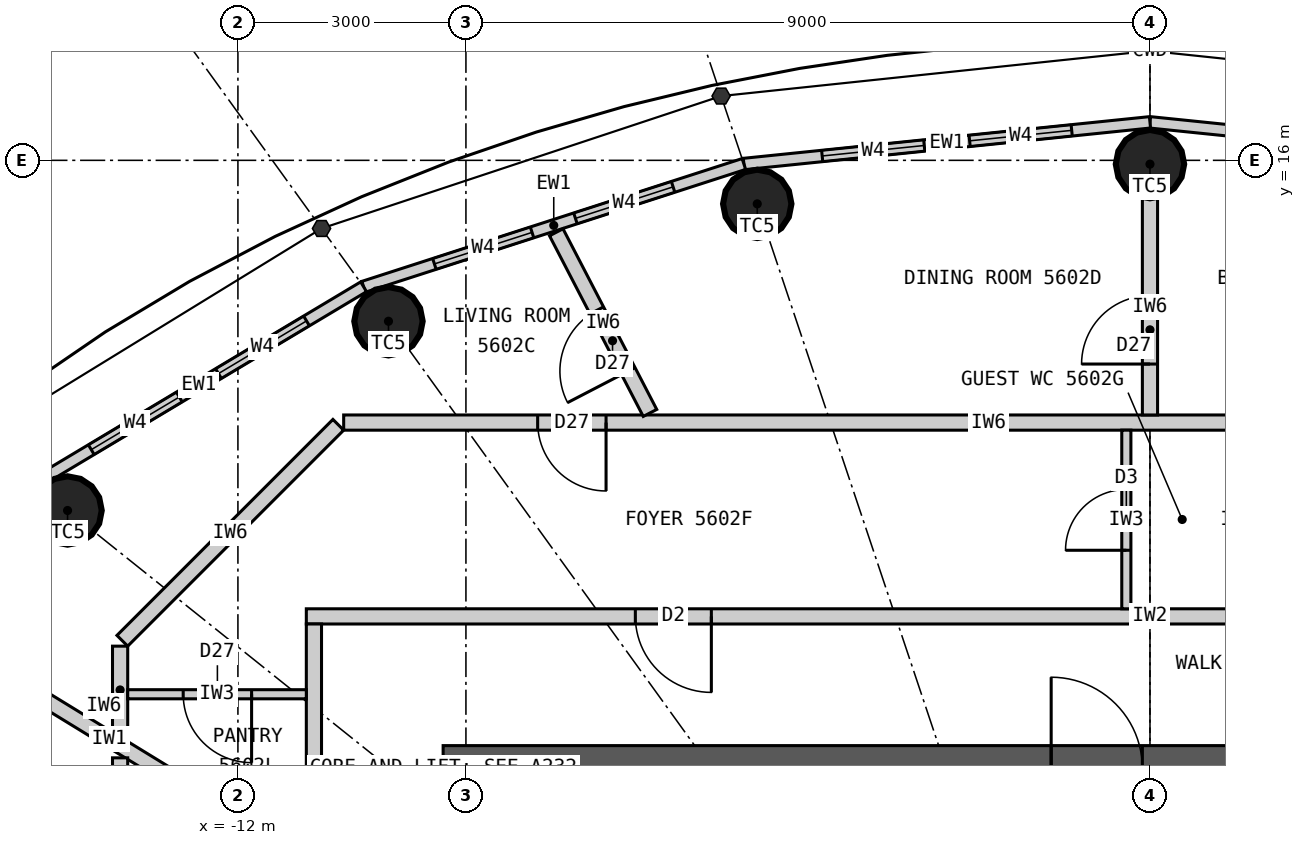
"""IFC4 building model, lengths in metres.
Left out: names, types, materials, properties, quantities, classifications, styles, units other than length and angle.
Written with IfcOpenShell. Run it as: python <this file> out.ifc"""

import sys

from ifc_helpers import new_model, si_unit, direction, frame, frame_2d, origin, origin_2d, place, context, subcontext, project, spatial, rectangle, circle, extrude, element, fill, save


model = new_model("IFC4")
c1 = context("Model", 3, precision=1e-05, world=origin(), true_north=direction((0.0, 1.0)))
c2 = subcontext(c1, "Body", "Model", "MODEL_VIEW")
j1 = project(units=[si_unit("LENGTHUNIT", "METRE"), si_unit("PLANEANGLEUNIT", "RADIAN")], contexts=[c1])
p1 = place(None, origin())
s1 = spatial("IfcSite", under=j1, at=p1, CompositionType="ELEMENT")
p2 = place(p1, origin())
s2 = spatial("IfcBuilding", under=s1, at=p2, CompositionType="ELEMENT")
p3 = place(p2, frame((0.0, 0.0, 209.4)))
s3 = spatial("IfcBuildingStorey", under=s2, at=p3, CompositionType="ELEMENT", Elevation=209.4)
for number, where, z_axis, x_axis in (
    (1, (0.0, 15.95, 0.0), (0.0, 0.0, 1.0), (1.0, 0.0, 0.0)),
    (2, (-5.167, 15.427, 0.0), (0.0, 0.0, 1.0), (1.0, 0.0, 0.0)),
    (3, (-10.019, 13.883, 0.0), (0.0, 0.0, 1.0), (1.0, 0.0, 0.0)),
    (4, (-14.241, 11.393, 0.0), (0.0, 0.0, 1.0), (1.0, 0.0, 0.0)),
):
    element("IfcColumn", number, at=place(p3, frame(where, z_axis=z_axis, x_axis=x_axis)), inside=s3, PredefinedType="COLUMN", context=c2, shape_type="SweptSolid", body=[
        extrude(circle(Radius=0.45, at=origin_2d()), origin(), (0.0, 0.0, 1.0), 3.3),
    ])
p4 = place(p3, frame((-9.3, 8.0, 0.0), z_axis=(0.0, 0.0, 1.0), x_axis=(1.0, 0.0, 0.0)))
e5 = element("IfcWall", 5, at=p4, inside=s3, PredefinedType="SHEAR", context=c2, shape_type="SweptSolid", body=[
    extrude(rectangle(XDim=18.6, YDim=0.6, at=frame_2d((9.3, 0.0))), origin(), (0.0, 0.0, 1.0), 3.3),
])
p5 = place(p4, frame((8.0, 0.0, 0.0)))
e6 = element("IfcOpeningElement", 6, at=p5, cuts=e5, PredefinedType="OPENING", context=c2, shape_type="SweptSolid", body=[
    extrude(rectangle(XDim=1.2, YDim=2.2, at=frame_2d((0.6, 1.1))), frame((0.0, 0.31, 0.0), z_axis=(0.0, -1.0, 0.0), x_axis=(1.0, 0.0, 0.0)), (0.0, 0.0, 1.0), 0.62),
])
p6 = place(p4, frame((15.6, 0.0, 0.0)))
e7 = element("IfcOpeningElement", 7, at=p6, cuts=e5, PredefinedType="OPENING", context=c2, shape_type="SweptSolid", body=[
    extrude(rectangle(XDim=0.9, YDim=2.2, at=frame_2d((0.45, 1.1))), frame((0.0, 0.31, 0.0), z_axis=(0.0, -1.0, 0.0), x_axis=(1.0, 0.0, 0.0)), (0.0, 0.0, 1.0), 0.62),
])
p7 = place(p3, frame((5.343, 15.952, 0.0), z_axis=(0.0, 0.0, 1.0), x_axis=(-0.994774574972, 0.102095763818, 0.0)))
e8 = element("IfcWall", 8, at=p7, inside=s3, PredefinedType="ELEMENTEDWALL", context=c2, shape_type="SweptSolid", body=[
    extrude(rectangle(XDim=5.371, YDim=0.15, at=frame_2d((2.686, 0.0))), origin(), (0.0, 0.0, 1.0), 3.12),
])
p8 = place(p7, frame((1.035, 0.0, 0.9)))
e9 = element("IfcOpeningElement", 9, at=p8, cuts=e8, PredefinedType="OPENING", context=c2, shape_type="SweptSolid", body=[
    extrude(rectangle(XDim=1.35, YDim=1.9, at=frame_2d((0.675, 0.95))), frame((0.0, 0.085, 0.0), z_axis=(0.0, -1.0, 0.0), x_axis=(1.0, 0.0, 0.0)), (0.0, 0.0, 1.0), 0.17),
])
p9 = place(p7, frame((2.985, 0.0, 0.9)))
e10 = element("IfcOpeningElement", 10, at=p9, cuts=e8, PredefinedType="OPENING", context=c2, shape_type="SweptSolid", body=[
    extrude(rectangle(XDim=1.35, YDim=1.9, at=frame_2d((0.675, 0.95))), frame((0.0, 0.085, 0.0), z_axis=(0.0, -1.0, 0.0), x_axis=(1.0, 0.0, 0.0)), (0.0, 0.0, 1.0), 0.17),
])
p10 = place(p3, frame((0.0, 16.5, 0.0), z_axis=(0.0, 0.0, 1.0), x_axis=(-0.994774574972, -0.102095763818, 0.0)))
e11 = element("IfcWall", 11, at=p10, inside=s3, PredefinedType="ELEMENTEDWALL", context=c2, shape_type="SweptSolid", body=[
    extrude(rectangle(XDim=5.371, YDim=0.15, at=frame_2d((2.686, 0.0))), origin(), (0.0, 0.0, 1.0), 3.12),
])
p11 = place(p10, frame((1.035, 0.0, 0.9)))
e12 = element("IfcOpeningElement", 12, at=p11, cuts=e11, PredefinedType="OPENING", context=c2, shape_type="SweptSolid", body=[
    extrude(rectangle(XDim=1.35, YDim=1.9, at=frame_2d((0.675, 0.95))), frame((0.0, 0.085, 0.0), z_axis=(0.0, -1.0, 0.0), x_axis=(1.0, 0.0, 0.0)), (0.0, 0.0, 1.0), 0.17),
])
p12 = place(p10, frame((2.985, 0.0, 0.9)))
e13 = element("IfcOpeningElement", 13, at=p12, cuts=e11, PredefinedType="OPENING", context=c2, shape_type="SweptSolid", body=[
    extrude(rectangle(XDim=1.35, YDim=1.9, at=frame_2d((0.675, 0.95))), frame((0.0, 0.085, 0.0), z_axis=(0.0, -1.0, 0.0), x_axis=(1.0, 0.0, 0.0)), (0.0, 0.0, 1.0), 0.17),
])
p13 = place(p3, frame((-5.343, 15.952, 0.0), z_axis=(0.0, 0.0, 1.0), x_axis=(-0.951644702515, -0.307200846638, 0.0)))
e14 = element("IfcWall", 14, at=p13, inside=s3, PredefinedType="ELEMENTEDWALL", context=c2, shape_type="SweptSolid", body=[
    extrude(rectangle(XDim=5.258, YDim=0.15, at=frame_2d((2.629, 0.0))), origin(), (0.0, 0.0, 1.0), 3.12),
])
p14 = place(p13, frame((0.979, 0.0, 0.9)))
e15 = element("IfcOpeningElement", 15, at=p14, cuts=e14, PredefinedType="OPENING", context=c2, shape_type="SweptSolid", body=[
    extrude(rectangle(XDim=1.35, YDim=1.9, at=frame_2d((0.675, 0.95))), frame((0.0, 0.085, 0.0), z_axis=(0.0, -1.0, 0.0), x_axis=(1.0, 0.0, 0.0)), (0.0, 0.0, 1.0), 0.17),
])
p15 = place(p13, frame((2.929, 0.0, 0.9)))
e16 = element("IfcOpeningElement", 16, at=p15, cuts=e14, PredefinedType="OPENING", context=c2, shape_type="SweptSolid", body=[
    extrude(rectangle(XDim=1.35, YDim=1.9, at=frame_2d((0.675, 0.95))), frame((0.0, 0.085, 0.0), z_axis=(0.0, -1.0, 0.0), x_axis=(1.0, 0.0, 0.0)), (0.0, 0.0, 1.0), 0.17),
])
p16 = place(p3, frame((-10.346, 14.336, 0.0), z_axis=(0.0, 0.0, 1.0), x_axis=(-0.85822150553, -0.513279502265, 0.0)))
e17 = element("IfcWall", 17, at=p16, inside=s3, PredefinedType="ELEMENTEDWALL", context=c2, shape_type="SweptSolid", body=[
    extrude(rectangle(XDim=5.05, YDim=0.15, at=frame_2d((2.525, 0.0))), origin(), (0.0, 0.0, 1.0), 3.12),
])
p17 = place(p16, frame((0.875, 0.0, 0.9)))
e18 = element("IfcOpeningElement", 18, at=p17, cuts=e17, PredefinedType="OPENING", context=c2, shape_type="SweptSolid", body=[
    extrude(rectangle(XDim=1.35, YDim=1.9, at=frame_2d((0.675, 0.95))), frame((0.0, 0.085, 0.0), z_axis=(0.0, -1.0, 0.0), x_axis=(1.0, 0.0, 0.0)), (0.0, 0.0, 1.0), 0.17),
])
p18 = place(p16, frame((2.825, 0.0, 0.9)))
e19 = element("IfcOpeningElement", 19, at=p18, cuts=e17, PredefinedType="OPENING", context=c2, shape_type="SweptSolid", body=[
    extrude(rectangle(XDim=1.35, YDim=1.9, at=frame_2d((0.675, 0.95))), frame((0.0, 0.085, 0.0), z_axis=(0.0, -1.0, 0.0), x_axis=(1.0, 0.0, 0.0)), (0.0, 0.0, 1.0), 0.17),
])
p19 = place(p3, frame((-11.1, 10.0, 0.0), z_axis=(0.0, 0.0, 1.0), x_axis=(1.0, 0.0, 0.0)))
e20 = element("IfcWall", 20, at=p19, inside=s3, PredefinedType="PARTITIONING", context=c2, shape_type="SweptSolid", body=[
    extrude(rectangle(XDim=22.2, YDim=0.2, at=frame_2d((11.1, 0.0))), origin(), (0.0, 0.0, 1.0), 3.12),
])
p20 = place(p19, frame((20.9, 0.0, 0.0)))
e21 = element("IfcOpeningElement", 21, at=p20, cuts=e20, PredefinedType="OPENING", context=c2, shape_type="SweptSolid", body=[
    extrude(rectangle(XDim=1.0, YDim=2.2, at=frame_2d((0.5, 1.1))), frame((0.0, 0.11, 0.0), z_axis=(0.0, -1.0, 0.0), x_axis=(1.0, 0.0, 0.0)), (0.0, 0.0, 1.0), 0.22),
])
p21 = place(p19, frame((4.329, 0.0, 0.0)))
e22 = element("IfcOpeningElement", 22, at=p21, cuts=e20, PredefinedType="OPENING", context=c2, shape_type="SweptSolid", body=[
    extrude(rectangle(XDim=1.0, YDim=2.2, at=frame_2d((0.5, 1.1))), frame((0.0, 0.11, 0.0), z_axis=(0.0, -1.0, 0.0), x_axis=(1.0, 0.0, 0.0)), (0.0, 0.0, 1.0), 0.22),
])
p22 = place(p3, frame((-11.0, 9.9, 0.0), z_axis=(0.0, 0.0, 1.0), x_axis=(0.0, -1.0, 0.0)))
e23 = element("IfcWall", 23, at=p22, inside=s3, PredefinedType="PARTITIONING", context=c2, shape_type="SweptSolid", body=[
    extrude(rectangle(XDim=19.8, YDim=0.2, at=frame_2d((9.9, 0.0))), origin(), (0.0, 0.0, 1.0), 3.12),
])
p23 = place(p22, frame((5.075, 0.0, 0.0)))
e24 = element("IfcOpeningElement", 24, at=p23, cuts=e23, PredefinedType="OPENING", context=c2, shape_type="SweptSolid", body=[
    extrude(rectangle(XDim=1.0, YDim=2.2, at=frame_2d((0.5, 1.1))), frame((0.0, 0.11, 0.0), z_axis=(0.0, -1.0, 0.0), x_axis=(1.0, 0.0, 0.0)), (0.0, 0.0, 1.0), 0.22),
])
p24 = place(p22, frame((18.645, 0.0, 0.0)))
e25 = element("IfcOpeningElement", 25, at=p24, cuts=e23, PredefinedType="OPENING", context=c2, shape_type="SweptSolid", body=[
    extrude(rectangle(XDim=1.0, YDim=2.2, at=frame_2d((0.5, 1.1))), frame((0.0, 0.11, 0.0), z_axis=(0.0, -1.0, 0.0), x_axis=(1.0, 0.0, 0.0)), (0.0, 0.0, 1.0), 0.22),
])
p25 = place(p3, frame((-11.1, 6.797, 0.0), z_axis=(0.0, 0.0, 1.0), x_axis=(-0.852799818179, 0.522237943963, 0.0)))
e26 = element("IfcWall", 26, at=p25, inside=s3, PredefinedType="PARTITIONING", context=c2, shape_type="SweptSolid", body=[
    extrude(rectangle(XDim=6.077, YDim=0.2, at=frame_2d((3.039, 0.0))), origin(), (0.0, 0.0, 1.0), 3.12),
])
p26 = place(p3, frame((6.364, 12.55, 0.0), z_axis=(0.0, 0.0, 1.0), x_axis=(-1.0, 0.0, 0.0)))
e27 = element("IfcWall", 27, at=p26, inside=s3, PredefinedType="PARTITIONING", context=c2, shape_type="SweptSolid", body=[
    extrude(rectangle(XDim=16.972, YDim=0.2, at=frame_2d((8.486, 0.0))), origin(), (0.0, 0.0, 1.0), 3.12),
])
p27 = place(p26, frame((2.525, 0.0, 0.0)))
e28 = element("IfcOpeningElement", 28, at=p27, cuts=e27, PredefinedType="OPENING", context=c2, shape_type="SweptSolid", body=[
    extrude(rectangle(XDim=0.8, YDim=2.1, at=frame_2d((0.4, 1.05))), frame((0.0, 0.11, 0.0), z_axis=(0.0, -1.0, 0.0), x_axis=(1.0, 0.0, 0.0)), (0.0, 0.0, 1.0), 0.22),
])
p28 = place(p26, frame((4.145, 0.0, 0.0)))
e29 = element("IfcOpeningElement", 29, at=p28, cuts=e27, PredefinedType="OPENING", context=c2, shape_type="SweptSolid", body=[
    extrude(rectangle(XDim=0.9, YDim=2.1, at=frame_2d((0.45, 1.05))), frame((0.0, 0.11, 0.0), z_axis=(0.0, -1.0, 0.0), x_axis=(1.0, 0.0, 0.0)), (0.0, 0.0, 1.0), 0.22),
])
p29 = place(p26, frame((13.52, 0.0, 0.0)))
e30 = element("IfcOpeningElement", 30, at=p29, cuts=e27, PredefinedType="OPENING", context=c2, shape_type="SweptSolid", body=[
    extrude(rectangle(XDim=0.9, YDim=2.1, at=frame_2d((0.45, 1.05))), frame((0.0, 0.11, 0.0), z_axis=(0.0, -1.0, 0.0), x_axis=(1.0, 0.0, 0.0)), (0.0, 0.0, 1.0), 0.22),
])
p30 = place(p3, frame((-10.679, 12.521, 0.0), z_axis=(0.0, 0.0, 1.0), x_axis=(-0.707106781187, -0.707106781187, 0.0)))
e31 = element("IfcWall", 31, at=p30, inside=s3, PredefinedType="PARTITIONING", context=c2, shape_type="SweptSolid", body=[
    extrude(rectangle(XDim=4.019, YDim=0.2, at=frame_2d((2.009, 0.0))), origin(), (0.0, 0.0, 1.0), 3.12),
])
p31 = place(p3, frame((-13.55, 9.609, 0.0), z_axis=(0.0, 0.0, 1.0), x_axis=(0.0, -1.0, 0.0)))
e32 = element("IfcWall", 32, at=p31, inside=s3, PredefinedType="PARTITIONING", context=c2, shape_type="SweptSolid", body=[
    extrude(rectangle(XDim=1.153, YDim=0.2, at=frame_2d((0.576, 0.0))), origin(), (0.0, 0.0, 1.0), 3.12),
])
p32 = place(p3, frame((0.0, 12.65, 0.0), z_axis=(0.0, 0.0, 1.0), x_axis=(0.0, 1.0, 0.0)))
e33 = element("IfcWall", 33, at=p32, inside=s3, PredefinedType="PARTITIONING", context=c2, shape_type="SweptSolid", body=[
    extrude(rectangle(XDim=2.85, YDim=0.2, at=frame_2d((1.425, 0.0))), origin(), (0.0, 0.0, 1.0), 2.42),
])
p33 = place(p32, frame((0.67, 0.0, 0.0)))
e34 = element("IfcOpeningElement", 34, at=p33, cuts=e33, PredefinedType="OPENING", context=c2, shape_type="SweptSolid", body=[
    extrude(rectangle(XDim=0.9, YDim=2.1, at=frame_2d((0.45, 1.05))), frame((0.0, 0.11, 0.0), z_axis=(0.0, -1.0, 0.0), x_axis=(1.0, 0.0, 0.0)), (0.0, 0.0, 1.0), 0.22),
])
p34 = place(p3, frame((-6.578, 12.677, 0.0), z_axis=(0.0, 0.0, 1.0), x_axis=(-0.460620531465, 0.887597164255, 0.0)))
e35 = element("IfcWall", 35, at=p34, inside=s3, PredefinedType="PARTITIONING", context=c2, shape_type="SweptSolid", body=[
    extrude(rectangle(XDim=2.678, YDim=0.2, at=frame_2d((1.339, 0.0))), origin(), (0.0, 0.0, 1.0), 3.12),
])
p35 = place(p34, frame((0.62, 0.0, 0.0)))
e36 = element("IfcOpeningElement", 36, at=p35, cuts=e35, PredefinedType="OPENING", context=c2, shape_type="SweptSolid", body=[
    extrude(rectangle(XDim=0.9, YDim=2.1, at=frame_2d((0.45, 1.05))), frame((0.0, 0.11, 0.0), z_axis=(0.0, -1.0, 0.0), x_axis=(1.0, 0.0, 0.0)), (0.0, 0.0, 1.0), 0.22),
])
p36 = place(p3, frame((-0.311, 10.1, 0.0), z_axis=(0.0, 0.0, 1.0), x_axis=(0.0, 1.0, 0.0)))
e37 = element("IfcWall", 37, at=p36, inside=s3, PredefinedType="PARTITIONING", context=c2, shape_type="SweptSolid", body=[
    extrude(rectangle(XDim=2.35, YDim=0.12, at=frame_2d((1.175, 0.0))), origin(), (0.0, 0.0, 1.0), 3.12),
])
p37 = place(p36, frame((0.77, 0.0, 0.0)))
e38 = element("IfcOpeningElement", 38, at=p37, cuts=e37, PredefinedType="OPENING", context=c2, shape_type="SweptSolid", body=[
    extrude(rectangle(XDim=0.8, YDim=2.1, at=frame_2d((0.4, 1.05))), frame((0.0, 0.07, 0.0), z_axis=(0.0, -1.0, 0.0), x_axis=(1.0, 0.0, 0.0)), (0.0, 0.0, 1.0), 0.14),
])
p38 = place(p3, frame((-11.1, 8.976, 0.0), z_axis=(0.0, 0.0, 1.0), x_axis=(-1.0, 0.0, 0.0)))
e39 = element("IfcWall", 39, at=p38, inside=s3, PredefinedType="PARTITIONING", context=c2, shape_type="SweptSolid", body=[
    extrude(rectangle(XDim=2.35, YDim=0.12, at=frame_2d((1.175, 0.0))), origin(), (0.0, 0.0, 1.0), 3.12),
])
p39 = place(p38, frame((0.72, 0.0, 0.0)))
e40 = element("IfcOpeningElement", 40, at=p39, cuts=e39, PredefinedType="OPENING", context=c2, shape_type="SweptSolid", body=[
    extrude(rectangle(XDim=0.9, YDim=2.1, at=frame_2d((0.45, 1.05))), frame((0.0, 0.07, 0.0), z_axis=(0.0, -1.0, 0.0), x_axis=(1.0, 0.0, 0.0)), (0.0, 0.0, 1.0), 0.14),
])
p40 = place(p3, frame((-13.55, 8.139, 0.0), z_axis=(0.0, 0.0, 1.0), x_axis=(0.0, -1.0, 0.0)))
e41 = element("IfcWall", 41, at=p40, inside=s3, PredefinedType="PARTITIONING", context=c2, shape_type="SweptSolid", body=[
    extrude(rectangle(XDim=12.496, YDim=0.2, at=frame_2d((6.248, 0.0))), origin(), (0.0, 0.0, 1.0), 3.12),
])
p41 = place(p40, frame((7.031, 0.0, 0.0)))
e42 = element("IfcOpeningElement", 42, at=p41, cuts=e41, PredefinedType="OPENING", context=c2, shape_type="SweptSolid", body=[
    extrude(rectangle(XDim=0.9, YDim=2.1, at=frame_2d((0.45, 1.05))), frame((0.0, 0.11, 0.0), z_axis=(0.0, -1.0, 0.0), x_axis=(1.0, 0.0, 0.0)), (0.0, 0.0, 1.0), 0.22),
])
p42 = place(p40, frame((9.373, 0.0, 0.0)))
e43 = element("IfcOpeningElement", 43, at=p42, cuts=e41, PredefinedType="OPENING", context=c2, shape_type="SweptSolid", body=[
    extrude(rectangle(XDim=0.8, YDim=2.1, at=frame_2d((0.4, 1.05))), frame((0.0, 0.11, 0.0), z_axis=(0.0, -1.0, 0.0), x_axis=(1.0, 0.0, 0.0)), (0.0, 0.0, 1.0), 0.22),
])
p43 = place(p40, frame((3.789, 0.0, 0.0)))
e44 = element("IfcOpeningElement", 44, at=p43, cuts=e41, PredefinedType="OPENING", context=c2, shape_type="SweptSolid", body=[
    extrude(rectangle(XDim=0.9, YDim=2.1, at=frame_2d((0.45, 1.05))), frame((0.0, 0.11, 0.0), z_axis=(0.0, -1.0, 0.0), x_axis=(1.0, 0.0, 0.0)), (0.0, 0.0, 1.0), 0.22),
])
p44 = place(p11, origin())
e45 = element("IfcWindow", 45, at=p44, inside=s3, PartitioningType="SINGLE_PANEL", PredefinedType="WINDOW", context=c2, shape_type="SweptSolid", body=[
    extrude(rectangle(XDim=1.35, YDim=1.9, at=frame_2d((0.675, 0.95))), frame((0.0, 0.03, 0.0), z_axis=(0.0, -1.0, 0.0), x_axis=(1.0, 0.0, 0.0)), (0.0, 0.0, 1.0), 0.06),
])
fill(e12, e45)
p45 = place(p12, origin())
e46 = element("IfcWindow", 46, at=p45, inside=s3, PartitioningType="SINGLE_PANEL", PredefinedType="WINDOW", context=c2, shape_type="SweptSolid", body=[
    extrude(rectangle(XDim=1.35, YDim=1.9, at=frame_2d((0.675, 0.95))), frame((0.0, 0.03, 0.0), z_axis=(0.0, -1.0, 0.0), x_axis=(1.0, 0.0, 0.0)), (0.0, 0.0, 1.0), 0.06),
])
fill(e13, e46)
p46 = place(p14, origin())
e47 = element("IfcWindow", 47, at=p46, inside=s3, PartitioningType="SINGLE_PANEL", PredefinedType="WINDOW", context=c2, shape_type="SweptSolid", body=[
    extrude(rectangle(XDim=1.35, YDim=1.9, at=frame_2d((0.675, 0.95))), frame((0.0, 0.03, 0.0), z_axis=(0.0, -1.0, 0.0), x_axis=(1.0, 0.0, 0.0)), (0.0, 0.0, 1.0), 0.06),
])
fill(e15, e47)
p47 = place(p15, origin())
e48 = element("IfcWindow", 48, at=p47, inside=s3, PartitioningType="SINGLE_PANEL", PredefinedType="WINDOW", context=c2, shape_type="SweptSolid", body=[
    extrude(rectangle(XDim=1.35, YDim=1.9, at=frame_2d((0.675, 0.95))), frame((0.0, 0.03, 0.0), z_axis=(0.0, -1.0, 0.0), x_axis=(1.0, 0.0, 0.0)), (0.0, 0.0, 1.0), 0.06),
])
fill(e16, e48)
p48 = place(p17, origin())
e49 = element("IfcWindow", 49, at=p48, inside=s3, PartitioningType="SINGLE_PANEL", PredefinedType="WINDOW", context=c2, shape_type="SweptSolid", body=[
    extrude(rectangle(XDim=1.35, YDim=1.9, at=frame_2d((0.675, 0.95))), frame((0.0, 0.03, 0.0), z_axis=(0.0, -1.0, 0.0), x_axis=(1.0, 0.0, 0.0)), (0.0, 0.0, 1.0), 0.06),
])
fill(e18, e49)
p49 = place(p18, origin())
e50 = element("IfcWindow", 50, at=p49, inside=s3, PartitioningType="SINGLE_PANEL", PredefinedType="WINDOW", context=c2, shape_type="SweptSolid", body=[
    extrude(rectangle(XDim=1.35, YDim=1.9, at=frame_2d((0.675, 0.95))), frame((0.0, 0.03, 0.0), z_axis=(0.0, -1.0, 0.0), x_axis=(1.0, 0.0, 0.0)), (0.0, 0.0, 1.0), 0.06),
])
fill(e19, e50)
p50 = place(p21, origin())
e51 = element("IfcDoor", 51, at=p50, inside=s3, OperationType="SINGLE_SWING_RIGHT", PredefinedType="DOOR", context=c2, shape_type="SweptSolid", body=[
    extrude(rectangle(XDim=1.0, YDim=2.2, at=frame_2d((0.5, 1.1))), frame((0.0, 0.025, 0.0), z_axis=(0.0, -1.0, 0.0), x_axis=(1.0, 0.0, 0.0)), (0.0, 0.0, 1.0), 0.05),
])
fill(e22, e51)
p51 = place(p37, origin())
e52 = element("IfcDoor", 52, at=p51, inside=s3, OperationType="SINGLE_SWING_LEFT", PredefinedType="DOOR", context=c2, shape_type="SweptSolid", body=[
    extrude(rectangle(XDim=0.8, YDim=2.1, at=frame_2d((0.4, 1.05))), frame((0.0, 0.025, 0.0), z_axis=(0.0, -1.0, 0.0), x_axis=(1.0, 0.0, 0.0)), (0.0, 0.0, 1.0), 0.05),
])
fill(e38, e52)
p52 = place(p39, origin())
e53 = element("IfcDoor", 53, at=p52, inside=s3, OperationType="SINGLE_SWING_LEFT", PredefinedType="DOOR", context=c2, shape_type="SweptSolid", body=[
    extrude(rectangle(XDim=0.9, YDim=2.1, at=frame_2d((0.45, 1.05))), frame((0.0, 0.025, 0.0), z_axis=(0.0, -1.0, 0.0), x_axis=(1.0, 0.0, 0.0)), (0.0, 0.0, 1.0), 0.05),
])
fill(e40, e53)
p53 = place(p29, origin())
e54 = element("IfcDoor", 54, at=p53, inside=s3, OperationType="SINGLE_SWING_LEFT", PredefinedType="DOOR", context=c2, shape_type="SweptSolid", body=[
    extrude(rectangle(XDim=0.9, YDim=2.1, at=frame_2d((0.45, 1.05))), frame((0.0, 0.025, 0.0), z_axis=(0.0, -1.0, 0.0), x_axis=(1.0, 0.0, 0.0)), (0.0, 0.0, 1.0), 0.05),
])
fill(e30, e54)
p54 = place(p33, origin())
e55 = element("IfcDoor", 55, at=p54, inside=s3, OperationType="SINGLE_SWING_LEFT", PredefinedType="DOOR", context=c2, shape_type="SweptSolid", body=[
    extrude(rectangle(XDim=0.9, YDim=2.1, at=frame_2d((0.45, 1.05))), frame((0.0, 0.025, 0.0), z_axis=(0.0, -1.0, 0.0), x_axis=(1.0, 0.0, 0.0)), (0.0, 0.0, 1.0), 0.05),
])
fill(e34, e55)
p55 = place(p35, origin())
e56 = element("IfcDoor", 56, at=p55, inside=s3, OperationType="SINGLE_SWING_LEFT", PredefinedType="DOOR", context=c2, shape_type="SweptSolid", body=[
    extrude(rectangle(XDim=0.9, YDim=2.1, at=frame_2d((0.45, 1.05))), frame((0.0, 0.025, 0.0), z_axis=(0.0, -1.0, 0.0), x_axis=(1.0, 0.0, 0.0)), (0.0, 0.0, 1.0), 0.05),
])
fill(e36, e56)
save(model, sys.argv[1])
